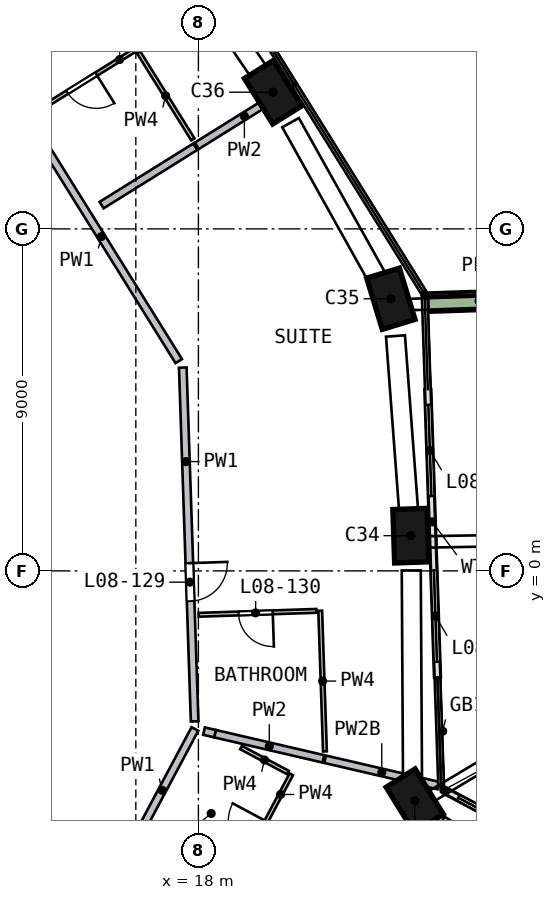
"""IFC4 building model, lengths in metres.
Left out: names, types, materials, properties, quantities, classifications, styles, units other than length and angle.
Written with IfcOpenShell. Run it as: python <this file> out.ifc"""

import sys

from ifc_helpers import new_model, si_unit, direction, frame, frame_2d, origin, origin_2d, place, context, subcontext, project, spatial, rectangle, extrude, element, fill, save


model = new_model("IFC4")
c1 = context("Model", 3, precision=1e-05, world=origin(), true_north=direction((0.0, 1.0)))
c2 = subcontext(c1, "Body", "Model", "MODEL_VIEW")
j1 = project(units=[si_unit("LENGTHUNIT", "METRE"), si_unit("PLANEANGLEUNIT", "RADIAN")], contexts=[c1])
p1 = place(None, origin())
s1 = spatial("IfcSite", under=j1, at=p1, CompositionType="ELEMENT")
p2 = place(p1, origin())
s2 = spatial("IfcBuilding", under=s1, at=p2, CompositionType="ELEMENT")
p3 = place(p2, frame((0.0, 0.0, 42.5)))
s3 = spatial("IfcBuildingStorey", under=s2, at=p3, CompositionType="ELEMENT", Elevation=42.5)
p4 = place(p3, frame((23.659, -6.184, 0.0), z_axis=(0.028506001, 0.112655717, 0.993225099), x_axis=(0.532308055, -0.842732837, 0.080308782)))
e1 = element("IfcColumn", 1, at=p4, inside=s3, PredefinedType="COLUMN", context=c2, shape_type="SweptSolid", body=[
    extrude(rectangle(XDim=1.4, YDim=0.9, at=origin_2d()), origin(), (0.0, 0.0, 1.0), 3.212),
])
p5 = place(p3, frame((23.595, 0.791, 0.0), z_axis=(-0.004715138, 0.112174655, 0.993677319), x_axis=(-0.033305651, 0.993119451, -0.112269718)))
e2 = element("IfcColumn", 2, at=p5, inside=s3, PredefinedType="COLUMN", context=c2, shape_type="SweptSolid", body=[
    extrude(rectangle(XDim=1.4, YDim=0.9, at=origin_2d()), origin(), (0.0, 0.0, 1.0), 3.21),
])
p6 = place(p3, frame((23.106, 7.029, 0.0), z_axis=(-0.034288586, 0.109632241, 0.993380624), x_axis=(0.288465817, -0.950575339, 0.114865125)))
e3 = element("IfcColumn", 3, at=p6, inside=s3, PredefinedType="COLUMN", context=c2, shape_type="SweptSolid", body=[
    extrude(rectangle(XDim=1.4, YDim=0.9, at=origin_2d()), origin(), (0.0, 0.0, 1.0), 3.211),
])
p7 = place(p3, frame((20.038, 12.482, 0.0), z_axis=(-0.060155823, 0.09483478, 0.99367381), x_axis=(-0.525120526, 0.843585782, -0.112300766)))
e4 = element("IfcColumn", 4, at=p7, inside=s3, PredefinedType="COLUMN", context=c2, shape_type="SweptSolid", body=[
    extrude(rectangle(XDim=1.4, YDim=0.9, at=origin_2d()), origin(), (0.0, 0.0, 1.0), 3.21),
])
p8 = place(p3, frame((27.312, -7.289, 0.0), z_axis=(0.0, 0.0, 1.0), x_axis=(-0.882272674, 0.470738706, 0.0)))
e5 = element("IfcWall", 5, at=p8, inside=s3, PredefinedType="SOLIDWALL", context=c2, shape_type="SweptSolid", body=[
    extrude(rectangle(XDim=3.2, YDim=0.15, at=frame_2d((1.6, 0.0))), origin(), (0.0, 0.0, 1.0), 2.425),
])
p9 = place(p8, frame((0.4, 0.0, 0.0)))
e6 = element("IfcOpeningElement", 6, at=p9, cuts=e5, PredefinedType="OPENING", context=c2, shape_type="SweptSolid", body=[
    extrude(rectangle(XDim=2.4, YDim=2.4, at=frame_2d((1.2, 1.2))), frame((0.0, 0.085, 0.0), z_axis=(0.0, -1.0, 0.0), x_axis=(1.0, 0.0, 0.0)), (0.0, 0.0, 1.0), 0.17),
])
p10 = place(p3, frame((24.29, -2.788, 0.0), z_axis=(0.0, 0.0, 1.0), x_axis=(-0.033499981, 0.999438718, 0.0)))
e7 = element("IfcWall", 7, at=p10, inside=s3, PredefinedType="SOLIDWALL", context=c2, shape_type="SweptSolid", body=[
    extrude(rectangle(XDim=3.6, YDim=0.15, at=frame_2d((1.8, 0.0))), origin(), (0.0, 0.0, 1.0), 2.425),
])
p11 = place(p10, frame((0.4, 0.0, 0.0)))
e8 = element("IfcOpeningElement", 8, at=p11, cuts=e7, PredefinedType="OPENING", context=c2, shape_type="SweptSolid", body=[
    extrude(rectangle(XDim=2.4, YDim=2.4, at=frame_2d((1.2, 1.2))), frame((0.0, 0.085, 0.0), z_axis=(0.0, -1.0, 0.0), x_axis=(1.0, 0.0, 0.0)), (0.0, 0.0, 1.0), 0.17),
])
p12 = place(p3, frame((24.17, 0.81, 0.0), z_axis=(0.0, 0.0, 1.0), x_axis=(-0.033472875, 0.999439626, 0.0)))
e9 = element("IfcWall", 9, at=p12, inside=s3, PredefinedType="SOLIDWALL", context=c2, shape_type="SweptSolid", body=[
    extrude(rectangle(XDim=3.96, YDim=0.15, at=frame_2d((1.98, 0.0))), origin(), (0.0, 0.0, 1.0), 2.425),
])
p13 = place(p12, frame((1.16, 0.0, 0.0)))
e10 = element("IfcOpeningElement", 10, at=p13, cuts=e9, PredefinedType="OPENING", context=c2, shape_type="SweptSolid", body=[
    extrude(rectangle(XDim=2.4, YDim=2.4, at=frame_2d((1.2, 1.2))), frame((0.0, 0.085, 0.0), z_axis=(0.0, -1.0, 0.0), x_axis=(1.0, 0.0, 0.0)), (0.0, 0.0, 1.0), 0.17),
])
p14 = place(p3, frame((26.734, 7.15, 0.0), z_axis=(0.0, 0.0, 1.0), x_axis=(-0.999439775, -0.033468433, 0.0)))
e11 = element("IfcWall", 11, at=p14, inside=s3, PredefinedType="SOLIDWALL", context=c2, shape_type="SweptSolid", body=[
    extrude(rectangle(XDim=2.699, YDim=0.5, at=frame_2d((1.35, 0.0))), origin(), (0.0, 0.0, 1.0), 0.7),
])
p15 = place(p3, frame((12.663, 13.258, 0.0), z_axis=(0.0, 0.0, 1.0), x_axis=(0.528736875, -0.84878579, 0.0)))
e12 = element("IfcWall", 12, at=p15, inside=s3, PredefinedType="SOLIDWALL", context=c2, shape_type="SweptSolid", body=[
    extrude(rectangle(XDim=9.116, YDim=0.2, at=frame_2d((4.558, 0.0))), origin(), (0.0, 0.0, 1.0), 3.19),
])
p16 = place(p15, frame((0.2, 0.0, 0.0)))
e13 = element("IfcOpeningElement", 13, at=p16, cuts=e12, PredefinedType="OPENING", context=c2, shape_type="SweptSolid", body=[
    extrude(rectangle(XDim=1.0, YDim=2.1, at=frame_2d((0.5, 1.05))), frame((0.0, 0.11, 0.0), z_axis=(0.0, -1.0, 0.0), x_axis=(1.0, 0.0, 0.0)), (0.0, 0.0, 1.0), 0.22),
])
p17 = place(p3, frame((16.186, -7.388, 0.0), z_axis=(0.0, 0.0, 1.0), x_axis=(0.470681754, 0.882303058, 0.0)))
e14 = element("IfcWall", 14, at=p17, inside=s3, PredefinedType="SOLIDWALL", context=c2, shape_type="SweptSolid", body=[
    extrude(rectangle(XDim=3.658, YDim=0.2, at=frame_2d((1.829, 0.0))), origin(), (0.0, 0.0, 1.0), 3.19),
])
p18 = place(p3, frame((17.589, 5.35, 0.0), z_axis=(0.0, 0.0, 1.0), x_axis=(0.033491964, -0.999438987, 0.0)))
e15 = element("IfcWall", 15, at=p18, inside=s3, PredefinedType="SOLIDWALL", context=c2, shape_type="SweptSolid", body=[
    extrude(rectangle(XDim=9.316, YDim=0.2, at=frame_2d((4.658, 0.0))), origin(), (0.0, 0.0, 1.0), 3.19),
])
p19 = place(p18, frame((5.15, 0.0, 0.0)))
e16 = element("IfcOpeningElement", 16, at=p19, cuts=e15, PredefinedType="OPENING", context=c2, shape_type="SweptSolid", body=[
    extrude(rectangle(XDim=1.0, YDim=2.1, at=frame_2d((0.5, 1.05))), frame((0.0, 0.11, 0.0), z_axis=(0.0, -1.0, 0.0), x_axis=(1.0, 0.0, 0.0)), (0.0, 0.0, 1.0), 0.22),
])
p20 = place(p3, frame((15.453, 9.626, 0.0), z_axis=(0.0, 0.0, 1.0), x_axis=(0.848785892, 0.528736711, 0.0)))
e17 = element("IfcWall", 17, at=p20, inside=s3, PredefinedType="SOLIDWALL", context=c2, shape_type="SweptSolid", body=[
    extrude(rectangle(XDim=2.905, YDim=0.2, at=frame_2d((1.452, 0.0))), origin(), (0.0, 0.0, 1.0), 3.19),
])
p21 = place(p3, frame((18.148, -4.216, 0.0), z_axis=(0.0, 0.0, 1.0), x_axis=(0.973883062, -0.227050173, 0.0)))
e18 = element("IfcWall", 18, at=p21, inside=s3, PredefinedType="SOLIDWALL", context=c2, shape_type="SweptSolid", body=[
    extrude(rectangle(XDim=0.301, YDim=0.2, at=frame_2d((0.15, 0.0))), origin(), (0.0, 0.0, 1.0), 3.19),
])
p22 = place(p3, frame((17.957, 11.186, 0.0), z_axis=(0.0, 0.0, 1.0), x_axis=(0.848791868, 0.528727118, 0.0)))
e19 = element("IfcWall", 19, at=p22, inside=s3, PredefinedType="SOLIDWALL", context=c2, shape_type="SweptSolid", body=[
    extrude(rectangle(XDim=2.952, YDim=0.2, at=frame_2d((1.476, 0.0))), origin(), (0.0, 0.0, 1.0), 3.19),
])
p23 = place(p3, frame((18.441, -4.285, 0.0), z_axis=(0.0, 0.0, 1.0), x_axis=(0.974072238, -0.22623721, 0.0)))
e20 = element("IfcWall", 20, at=p23, inside=s3, PredefinedType="SOLIDWALL", context=c2, shape_type="SweptSolid", body=[
    extrude(rectangle(XDim=2.925, YDim=0.2, at=frame_2d((1.462, 0.0))), origin(), (0.0, 0.0, 1.0), 3.19),
])
p24 = place(p3, frame((21.334, -4.957, 0.0), z_axis=(0.0, 0.0, 1.0), x_axis=(0.974051382, -0.226326987, 0.0)))
e21 = element("IfcWall", 21, at=p24, inside=s3, PredefinedType="SOLIDWALL", context=c2, shape_type="SweptSolid", body=[
    extrude(rectangle(XDim=3.061, YDim=0.2, at=frame_2d((1.531, 0.0))), origin(), (0.0, 0.0, 1.0), 2.69),
])
p25 = place(p3, frame((16.373, 13.733, 0.0), z_axis=(0.0, 0.0, 1.0), x_axis=(-0.848811643, -0.52869537, 0.0)))
e22 = element("IfcWall", 22, at=p25, inside=s3, PredefinedType="PARTITIONING", context=c2, shape_type="SweptSolid", body=[
    extrude(rectangle(XDim=3.2, YDim=0.1, at=frame_2d((1.6, 0.0))), origin(), (0.0, 0.0, 1.0), 3.19),
])
p26 = place(p25, frame((1.25, 0.0, 0.0)))
e23 = element("IfcOpeningElement", 23, at=p26, cuts=e22, PredefinedType="OPENING", context=c2, shape_type="SweptSolid", body=[
    extrude(rectangle(XDim=0.9, YDim=2.1, at=frame_2d((0.45, 1.05))), frame((0.0, 0.06, 0.0), z_axis=(0.0, -1.0, 0.0), x_axis=(1.0, 0.0, 0.0)), (0.0, 0.0, 1.0), 0.12),
])
p27 = place(p3, frame((16.426, 13.649, 0.0), z_axis=(0.0, 0.0, 1.0), x_axis=(0.528771123, -0.848764455, 0.0)))
e24 = element("IfcWall", 24, at=p27, inside=s3, PredefinedType="PARTITIONING", context=c2, shape_type="SweptSolid", body=[
    extrude(rectangle(XDim=2.7, YDim=0.1, at=frame_2d((1.35, 0.0))), origin(), (0.0, 0.0, 1.0), 3.19),
])
p28 = place(p3, frame((21.105, -1.052, 0.0), z_axis=(0.0, 0.0, 1.0), x_axis=(-0.999437101, -0.0335482, 0.0)))
e25 = element("IfcWall", 25, at=p28, inside=s3, PredefinedType="PARTITIONING", context=c2, shape_type="SweptSolid", body=[
    extrude(rectangle(XDim=3.1, YDim=0.1, at=frame_2d((1.55, 0.0))), origin(), (0.0, 0.0, 1.0), 3.19),
])
p29 = place(p28, frame((1.15, 0.0, 0.0)))
e26 = element("IfcOpeningElement", 26, at=p29, cuts=e25, PredefinedType="OPENING", context=c2, shape_type="SweptSolid", body=[
    extrude(rectangle(XDim=0.9, YDim=2.1, at=frame_2d((0.45, 1.05))), frame((0.0, 0.06, 0.0), z_axis=(0.0, -1.0, 0.0), x_axis=(1.0, 0.0, 0.0)), (0.0, 0.0, 1.0), 0.12),
])
p30 = place(p3, frame((18.75, -8.53, 0.0), z_axis=(0.0, 0.0, 1.0), x_axis=(0.470739592, 0.882272201, 0.0)))
e27 = element("IfcWall", 27, at=p30, inside=s3, PredefinedType="PARTITIONING", context=c2, shape_type="SweptSolid", body=[
    extrude(rectangle(XDim=3.6, YDim=0.1, at=frame_2d((1.8, 0.0))), origin(), (0.0, 0.0, 1.0), 3.19),
])
p31 = place(p30, frame((1.2, 0.0, 0.0)))
e28 = element("IfcOpeningElement", 28, at=p31, cuts=e27, PredefinedType="OPENING", context=c2, shape_type="SweptSolid", body=[
    extrude(rectangle(XDim=1.0, YDim=2.1, at=frame_2d((0.5, 1.05))), frame((0.0, 0.06, 0.0), z_axis=(0.0, -1.0, 0.0), x_axis=(1.0, 0.0, 0.0)), (0.0, 0.0, 1.0), 0.12),
])
p32 = place(p3, frame((19.123, -4.648, 0.0), z_axis=(0.0, 0.0, 1.0), x_axis=(0.882241776, -0.470796611, 0.0)))
e29 = element("IfcWall", 29, at=p32, inside=s3, PredefinedType="PARTITIONING", context=c2, shape_type="SweptSolid", body=[
    extrude(rectangle(XDim=1.399, YDim=0.1, at=frame_2d((0.699, 0.0))), origin(), (0.0, 0.0, 1.0), 3.19),
])
p33 = place(p3, frame((21.205, -1.049, 0.0), z_axis=(0.0, 0.0, 1.0), x_axis=(0.033551868, -0.999436978, 0.0)))
e30 = element("IfcWall", 30, at=p33, inside=s3, PredefinedType="PARTITIONING", context=c2, shape_type="SweptSolid", body=[
    extrude(rectangle(XDim=3.704, YDim=0.1, at=frame_2d((1.852, 0.0))), origin(), (0.0, 0.0, 1.0), 3.19),
])
p34 = place(p9, origin())
e31 = element("IfcDoor", 31, at=p34, inside=s3, OperationType="SLIDING_TO_RIGHT", PredefinedType="DOOR", context=c2, shape_type="SweptSolid", body=[
    extrude(rectangle(XDim=2.4, YDim=2.4, at=frame_2d((1.2, 1.2))), frame((0.0, 0.025, 0.0), z_axis=(0.0, -1.0, 0.0), x_axis=(1.0, 0.0, 0.0)), (0.0, 0.0, 1.0), 0.05),
])
fill(e6, e31)
p35 = place(p11, origin())
e32 = element("IfcDoor", 32, at=p35, inside=s3, OperationType="SLIDING_TO_RIGHT", PredefinedType="DOOR", context=c2, shape_type="SweptSolid", body=[
    extrude(rectangle(XDim=2.4, YDim=2.4, at=frame_2d((1.2, 1.2))), frame((0.0, 0.025, 0.0), z_axis=(0.0, -1.0, 0.0), x_axis=(1.0, 0.0, 0.0)), (0.0, 0.0, 1.0), 0.05),
])
fill(e8, e32)
p36 = place(p13, origin())
e33 = element("IfcDoor", 33, at=p36, inside=s3, OperationType="SLIDING_TO_LEFT", PredefinedType="DOOR", context=c2, shape_type="SweptSolid", body=[
    extrude(rectangle(XDim=2.4, YDim=2.4, at=frame_2d((1.2, 1.2))), frame((0.0, 0.025, 0.0), z_axis=(0.0, -1.0, 0.0), x_axis=(1.0, 0.0, 0.0)), (0.0, 0.0, 1.0), 0.05),
])
fill(e10, e33)
p37 = place(p19, origin())
e34 = element("IfcDoor", 34, at=p37, inside=s3, OperationType="SINGLE_SWING_LEFT", PredefinedType="DOOR", context=c2, shape_type="SweptSolid", body=[
    extrude(rectangle(XDim=1.0, YDim=2.1, at=frame_2d((0.5, 1.05))), frame((0.0, 0.025, 0.0), z_axis=(0.0, -1.0, 0.0), x_axis=(1.0, 0.0, 0.0)), (0.0, 0.0, 1.0), 0.05),
])
fill(e16, e34)
p38 = place(p29, origin())
e35 = element("IfcDoor", 35, at=p38, inside=s3, OperationType="SINGLE_SWING_LEFT", PredefinedType="DOOR", context=c2, shape_type="SweptSolid", body=[
    extrude(rectangle(XDim=0.9, YDim=2.1, at=frame_2d((0.45, 1.05))), frame((0.0, 0.025, 0.0), z_axis=(0.0, -1.0, 0.0), x_axis=(1.0, 0.0, 0.0)), (0.0, 0.0, 1.0), 0.05),
])
fill(e26, e35)
p39 = place(p26, origin())
e36 = element("IfcDoor", 36, at=p39, inside=s3, OperationType="SINGLE_SWING_LEFT", PredefinedType="DOOR", context=c2, shape_type="SweptSolid", body=[
    extrude(rectangle(XDim=0.9, YDim=2.1, at=frame_2d((0.45, 1.05))), frame((0.0, 0.025, 0.0), z_axis=(0.0, -1.0, 0.0), x_axis=(1.0, 0.0, 0.0)), (0.0, 0.0, 1.0), 0.05),
])
fill(e23, e36)
save(model, sys.argv[1])
